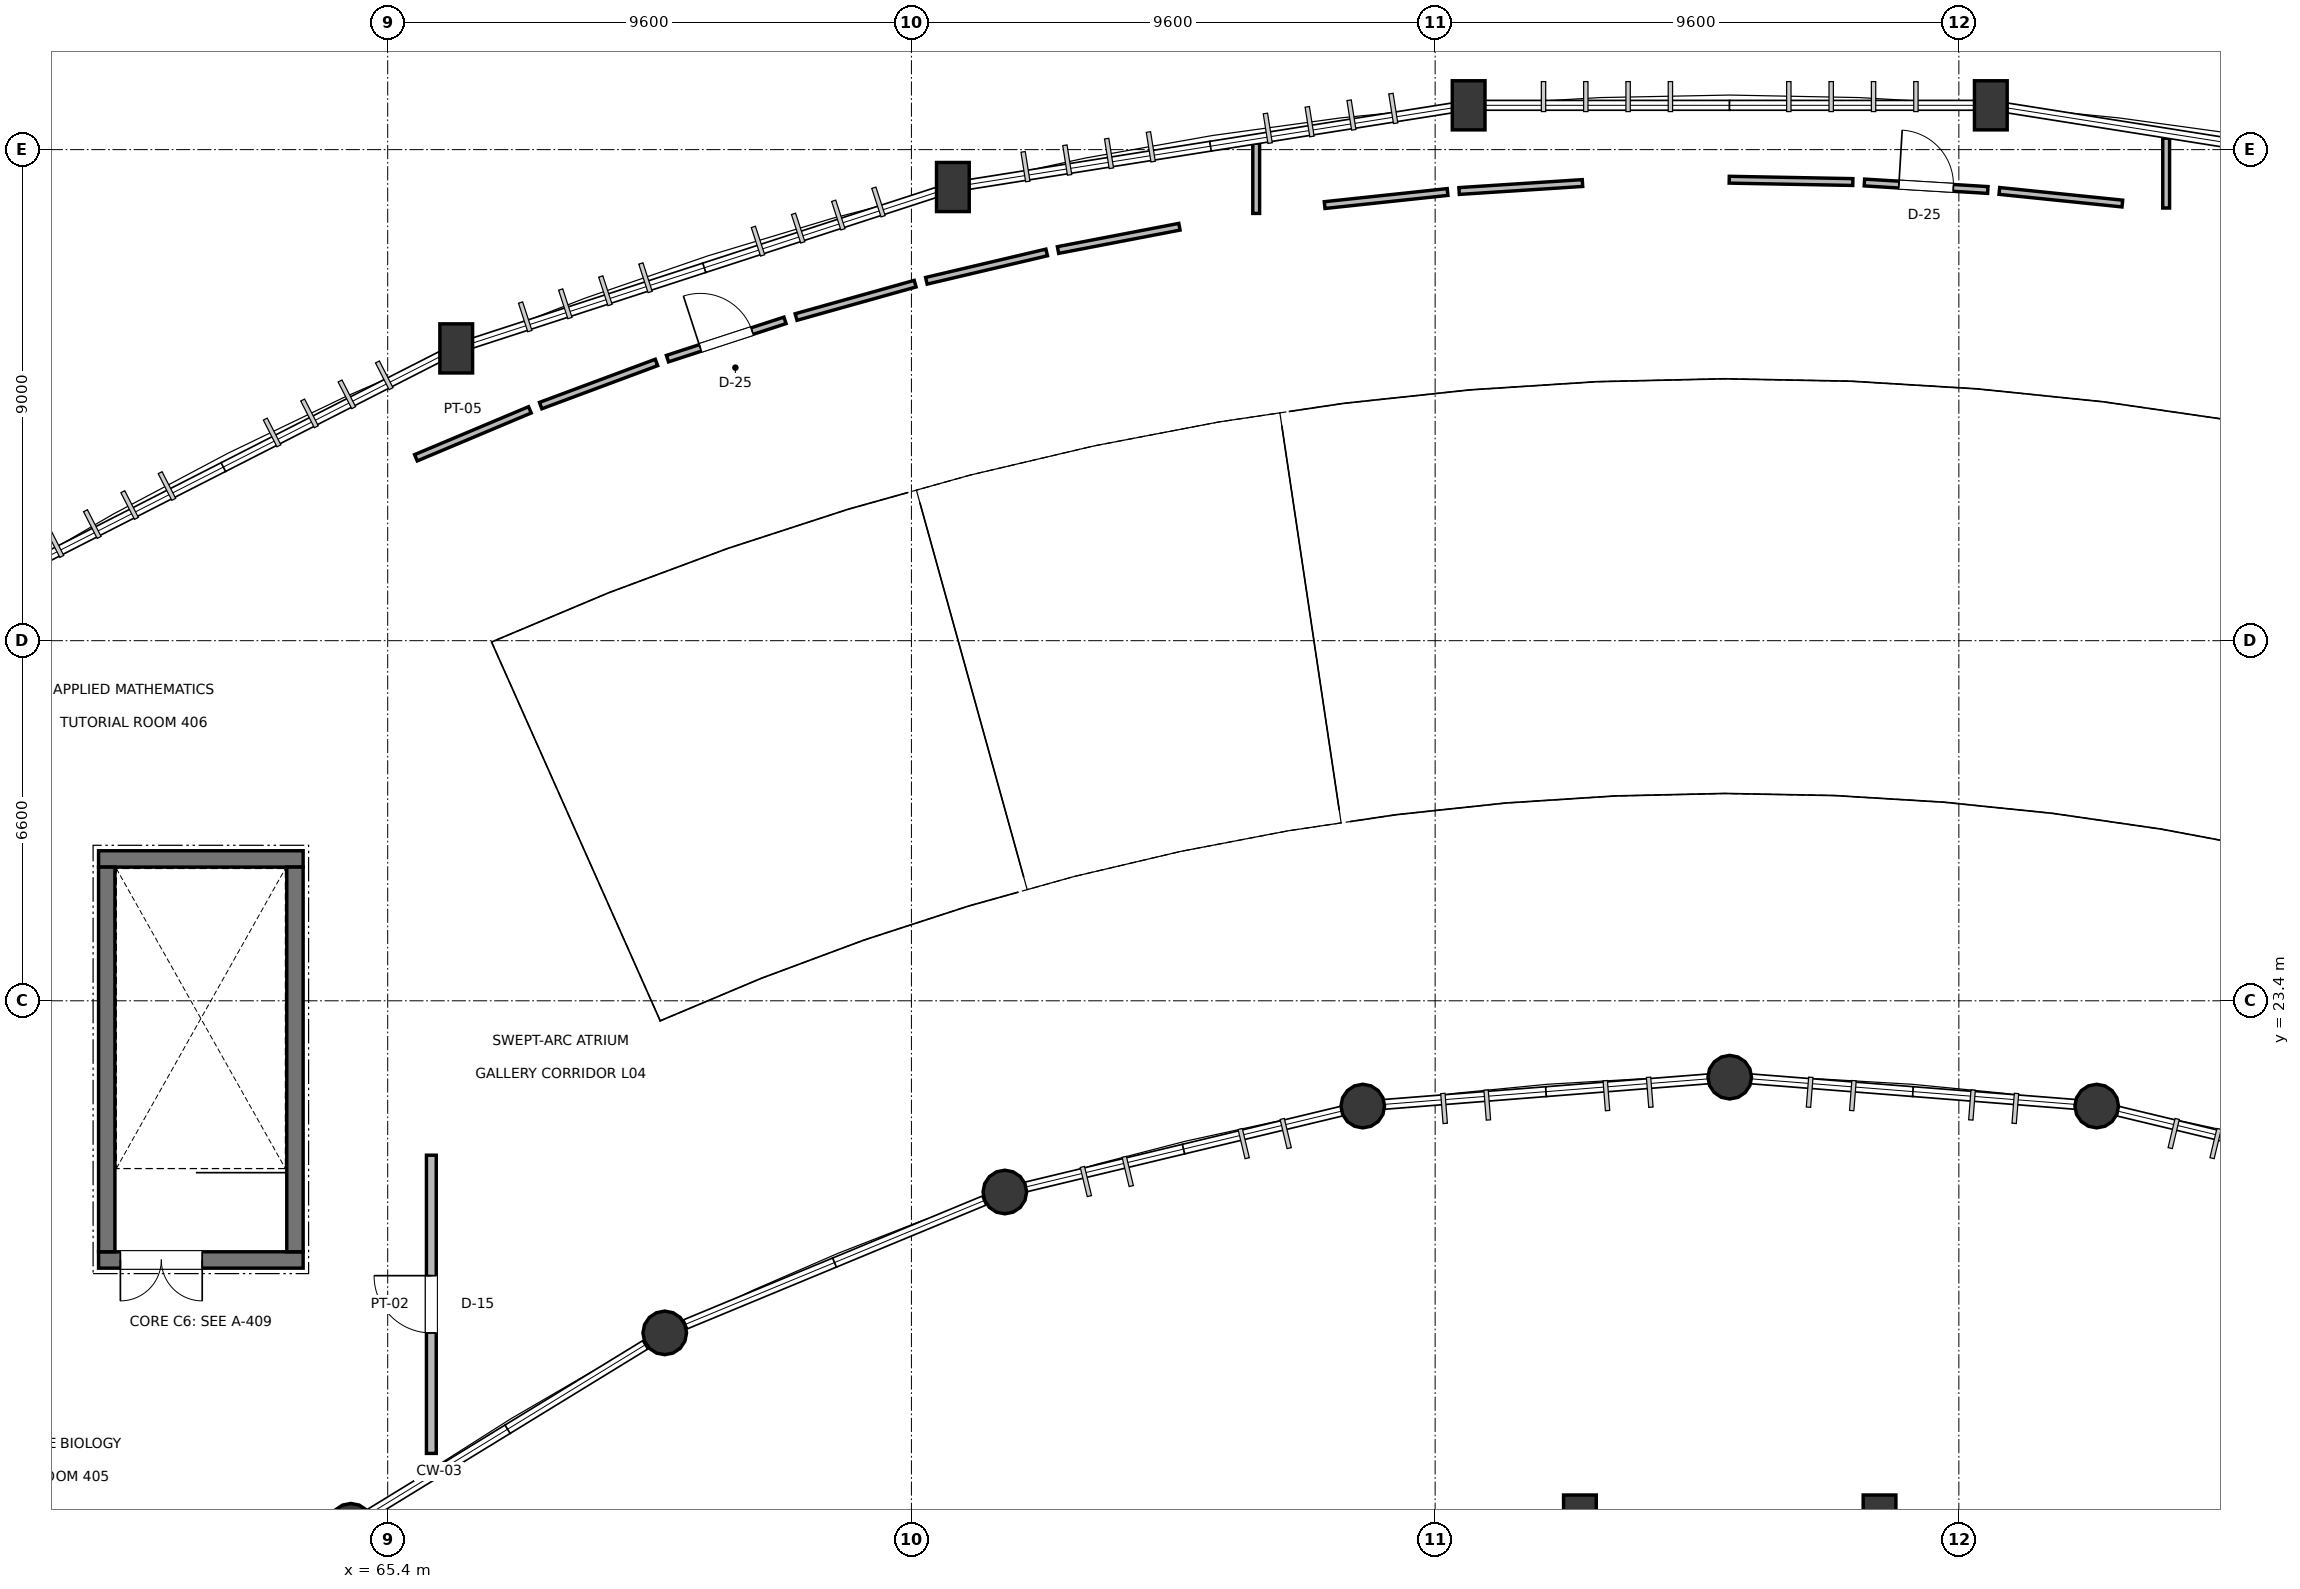
"""IFC4 building model, lengths in metres.
Left out: names, types, materials, properties, quantities, classifications, styles, units other than length and angle.
Written with IfcOpenShell. Run it as: python <this file> out.ifc"""

import sys

from ifc_helpers import new_model, si_unit, direction, frame, frame_2d, origin, origin_2d, place, context, subcontext, project, spatial, rectangle, circle, extrude, element, fill, save


model = new_model("IFC4")
c1 = context("Model", 3, precision=1e-05, world=origin(), true_north=direction((0.0, 1.0)))
c2 = subcontext(c1, "Body", "Model", "MODEL_VIEW")
j1 = project(units=[si_unit("LENGTHUNIT", "METRE"), si_unit("PLANEANGLEUNIT", "RADIAN")], contexts=[c1])
p1 = place(None, origin())
s1 = spatial("IfcSite", under=j1, at=p1, CompositionType="ELEMENT")
p2 = place(p1, origin())
s2 = spatial("IfcBuilding", under=s1, at=p2, CompositionType="ELEMENT")
p3 = place(p2, frame((0.0, 0.0, 19.5)))
s3 = spatial("IfcBuildingStorey", under=s2, at=p3, CompositionType="ELEMENT", Elevation=19.5)
for number, where, z_axis, x_axis in (
    (1, (66.656, 35.357, 0.0), (0.0, 0.0, 1.0), (1.0, 0.0, 0.0)),
    (2, (75.76, 38.315, 0.0), (0.0, 0.0, 1.0), (1.0, 0.0, 0.0)),
    (3, (87.254, 13.892, 0.0), (0.0, 0.0, 1.0), (1.0, 0.0, 0.0)),
    (4, (85.214, 39.812, 0.0), (0.0, 0.0, 1.0), (1.0, 0.0, 0.0)),
    (5, (92.746, 13.892, 0.0), (0.0, 0.0, 1.0), (1.0, 0.0, 0.0)),
    (6, (94.786, 39.812, 0.0), (0.0, 0.0, 1.0), (1.0, 0.0, 0.0)),
):
    element("IfcColumn", number, at=place(p3, frame(where, z_axis=z_axis, x_axis=x_axis)), inside=s3, PredefinedType="COLUMN", context=c2, shape_type="SweptSolid", body=[
        extrude(rectangle(XDim=0.6, YDim=0.9, at=origin_2d()), origin(), (0.0, 0.0, 1.0), 4.5),
    ])
for number, where, z_axis, x_axis in (
    (7, (64.725, 13.788, 0.0), (0.0, 0.0, 1.0), (1.0, 0.0, 0.0)),
    (8, (70.479, 17.313, 0.0), (0.0, 0.0, 1.0), (1.0, 0.0, 0.0)),
    (9, (76.712, 19.896, 0.0), (0.0, 0.0, 1.0), (1.0, 0.0, 0.0)),
    (10, (83.273, 21.471, 0.0), (0.0, 0.0, 1.0), (1.0, 0.0, 0.0)),
    (11, (90.0, 22.0, 0.0), (0.0, 0.0, 1.0), (1.0, 0.0, 0.0)),
    (12, (96.727, 21.471, 0.0), (0.0, 0.0, 1.0), (1.0, 0.0, 0.0)),
):
    element("IfcColumn", number, at=place(p3, frame(where, z_axis=z_axis, x_axis=x_axis)), inside=s3, PredefinedType="COLUMN", context=c2, shape_type="SweptSolid", body=[
        extrude(circle(Radius=0.4, at=origin_2d()), origin(), (0.0, 0.0, 1.0), 4.5),
    ])
p4 = place(p3, frame((60.1, 18.65, 0.0), z_axis=(0.0, 0.0, 1.0), x_axis=(1.0, 0.0, 0.0)))
e13 = element("IfcWall", 13, at=p4, inside=s3, PredefinedType="SHEAR", context=c2, shape_type="SweptSolid", body=[
    extrude(rectangle(XDim=3.75, YDim=0.3, at=frame_2d((1.875, 0.0))), origin(), (0.0, 0.0, 1.0), 4.28),
])
p5 = place(p4, frame((0.4, 0.0, 0.0)))
e14 = element("IfcOpeningElement", 14, at=p5, cuts=e13, PredefinedType="OPENING", context=c2, shape_type="SweptSolid", body=[
    extrude(rectangle(XDim=1.5, YDim=2.2, at=frame_2d((0.75, 1.1))), frame((0.0, 0.16, 0.0), z_axis=(0.0, -1.0, 0.0), x_axis=(1.0, 0.0, 0.0)), (0.0, 0.0, 1.0), 0.32),
])
p6 = place(p3, frame((60.1, 26.0, 0.0), z_axis=(0.0, 0.0, 1.0), x_axis=(1.0, 0.0, 0.0)))
e15 = element("IfcWall", 15, at=p6, inside=s3, PredefinedType="SHEAR", context=c2, shape_type="SweptSolid", body=[
    extrude(rectangle(XDim=3.75, YDim=0.3, at=frame_2d((1.875, 0.0))), origin(), (0.0, 0.0, 1.0), 4.28),
])
for number, where, z_axis, x_axis in (
    (16, (60.25, 18.8, 0.0), (0.0, 0.0, 1.0), (0.0, 1.0, 0.0)),
    (17, (63.7, 18.8, 0.0), (0.0, 0.0, 1.0), (0.0, 1.0, 0.0)),
):
    element("IfcWall", number, at=place(p3, frame(where, z_axis=z_axis, x_axis=x_axis)), inside=s3, PredefinedType="SHEAR", context=c2, shape_type="SweptSolid", body=[
        extrude(rectangle(XDim=7.05, YDim=0.3, at=frame_2d((3.525, 0.0))), origin(), (0.0, 0.0, 1.0), 4.28),
    ])
for number, where, z_axis, x_axis in (
    (18, (65.917, 33.352, 0.0), (0.0, 0.0, 1.0), (0.922, 0.388, 0.0)),
    (19, (68.203, 34.309, 0.0), (0.0, 0.0, 1.0), (0.937, 0.349, 0.0)),
):
    element("IfcWall", number, at=place(p3, frame(where, z_axis=z_axis, x_axis=x_axis)), inside=s3, PredefinedType="PARTITIONING", context=c2, shape_type="SweptSolid", body=[
        extrude(rectangle(XDim=2.266, YDim=0.125, at=frame_2d((1.133, 0.0))), origin(), (0.0, 0.0, 1.0), 3.405),
    ])
p7 = place(p3, frame((70.528, 35.169, 0.0), z_axis=(0.0, 0.0, 1.0), x_axis=(0.950910506912, 0.309466004345, 0.0)))
e20 = element("IfcWall", 20, at=p7, inside=s3, PredefinedType="PARTITIONING", context=c2, shape_type="SweptSolid", body=[
    extrude(rectangle(XDim=2.267, YDim=0.125, at=frame_2d((1.133, 0.0))), origin(), (0.0, 0.0, 1.0), 3.405),
])
p8 = place(p7, frame((0.633, 0.0, 0.0)))
e21 = element("IfcOpeningElement", 21, at=p8, cuts=e20, PredefinedType="OPENING", context=c2, shape_type="SweptSolid", body=[
    extrude(rectangle(XDim=1.0, YDim=2.15, at=frame_2d((0.5, 1.075))), frame((0.0, 0.073, 0.0), z_axis=(0.0, -1.0, 0.0), x_axis=(1.0, 0.0, 0.0)), (0.0, 0.0, 1.0), 0.145),
])
for number, where, z_axis, x_axis in (
    (22, (72.886, 35.932, 0.0), (0.0, 0.0, 1.0), (0.963, 0.27, 0.0)),
    (23, (75.274, 36.596, 0.0), (0.0, 0.0, 1.0), (0.973, 0.229, 0.0)),
):
    element("IfcWall", number, at=place(p3, frame(where, z_axis=z_axis, x_axis=x_axis)), inside=s3, PredefinedType="PARTITIONING", context=c2, shape_type="SweptSolid", body=[
        extrude(rectangle(XDim=2.266, YDim=0.125, at=frame_2d((1.133, 0.0))), origin(), (0.0, 0.0, 1.0), 3.405),
    ])
p9 = place(p3, frame((77.688, 37.16, 0.0), z_axis=(0.0, 0.0, 1.0), x_axis=(0.982087808033, 0.188423823634, 0.0)))
e24 = element("IfcWall", 24, at=p9, inside=s3, PredefinedType="PARTITIONING", context=c2, shape_type="SweptSolid", body=[
    extrude(rectangle(XDim=2.266, YDim=0.125, at=frame_2d((1.133, 0.0))), origin(), (0.0, 0.0, 1.0), 4.18),
])
p10 = place(p3, frame((82.574, 37.983, 0.0), z_axis=(0.0, 0.0, 1.0), x_axis=(0.994366469197, 0.105996815696, 0.0)))
e25 = element("IfcWall", 25, at=p10, inside=s3, PredefinedType="PARTITIONING", context=c2, shape_type="SweptSolid", body=[
    extrude(rectangle(XDim=2.266, YDim=0.125, at=frame_2d((1.133, 0.0))), origin(), (0.0, 0.0, 1.0), 3.405),
])
p11 = place(p3, frame((85.039, 38.241, 0.0), z_axis=(0.0, 0.0, 1.0), x_axis=(0.997915696942, 0.064531091706, 0.0)))
e26 = element("IfcWall", 26, at=p11, inside=s3, PredefinedType="PARTITIONING", context=c2, shape_type="SweptSolid", body=[
    extrude(rectangle(XDim=2.266, YDim=0.125, at=frame_2d((1.133, 0.0))), origin(), (0.0, 0.0, 1.0), 3.405),
])
p12 = place(p3, frame((89.991, 38.448, 0.0), z_axis=(0.0, 0.0, 1.0), x_axis=(0.999822278173, -0.018852375679, 0.0)))
e27 = element("IfcWall", 27, at=p12, inside=s3, PredefinedType="PARTITIONING", context=c2, shape_type="SweptSolid", body=[
    extrude(rectangle(XDim=2.266, YDim=0.125, at=frame_2d((1.133, 0.0))), origin(), (0.0, 0.0, 1.0), 4.18),
])
p13 = place(p3, frame((92.469, 38.397, 0.0), z_axis=(0.0, 0.0, 1.0), x_axis=(0.998159220571, -0.060647921561, 0.0)))
e28 = element("IfcWall", 28, at=p13, inside=s3, PredefinedType="PARTITIONING", context=c2, shape_type="SweptSolid", body=[
    extrude(rectangle(XDim=2.266, YDim=0.125, at=frame_2d((1.133, 0.0))), origin(), (0.0, 0.0, 1.0), 3.405),
])
p14 = place(p13, frame((0.633, 0.0, 0.0)))
e29 = element("IfcOpeningElement", 29, at=p14, cuts=e28, PredefinedType="OPENING", context=c2, shape_type="SweptSolid", body=[
    extrude(rectangle(XDim=1.0, YDim=2.15, at=frame_2d((0.5, 1.075))), frame((0.0, 0.073, 0.0), z_axis=(0.0, -1.0, 0.0), x_axis=(1.0, 0.0, 0.0)), (0.0, 0.0, 1.0), 0.145),
])
p15 = place(p3, frame((94.942, 38.243, 0.0), z_axis=(0.0, 0.0, 1.0), x_axis=(0.994772464136, -0.102116328749, 0.0)))
e30 = element("IfcWall", 30, at=p15, inside=s3, PredefinedType="PARTITIONING", context=c2, shape_type="SweptSolid", body=[
    extrude(rectangle(XDim=2.267, YDim=0.125, at=frame_2d((1.133, 0.0))), origin(), (0.0, 0.0, 1.0), 3.405),
])
p16 = place(p3, frame((66.2, 15.105, 0.0), z_axis=(0.0, 0.0, 1.0), x_axis=(0.0, 1.0, 0.0)))
e31 = element("IfcWall", 31, at=p16, inside=s3, PredefinedType="PARTITIONING", context=c2, shape_type="SweptSolid", body=[
    extrude(rectangle(XDim=5.465, YDim=0.18, at=frame_2d((2.733, 0.0))), origin(), (0.0, 0.0, 1.0), 3.405),
])
p17 = place(p16, frame((2.208, 0.0, 0.0)))
e32 = element("IfcOpeningElement", 32, at=p17, cuts=e31, PredefinedType="OPENING", context=c2, shape_type="SweptSolid", body=[
    extrude(rectangle(XDim=1.05, YDim=2.2, at=frame_2d((0.525, 1.1))), frame((0.0, 0.1, 0.0), z_axis=(0.0, -1.0, 0.0), x_axis=(1.0, 0.0, 0.0)), (0.0, 0.0, 1.0), 0.2),
])
p18 = place(p3, frame((81.32, 37.831, 0.0), z_axis=(0.0, 0.0, 1.0), x_axis=(0.0, 1.0, 0.0)))
e33 = element("IfcWall", 33, at=p18, inside=s3, PredefinedType="PARTITIONING", context=c2, shape_type="SweptSolid", body=[
    extrude(rectangle(XDim=1.286, YDim=0.125, at=frame_2d((0.643, 0.0))), origin(), (0.0, 0.0, 1.0), 3.405),
])
p19 = place(p3, frame((98.0, 37.929, 0.0), z_axis=(0.0, 0.0, 1.0), x_axis=(0.0, 1.0, 0.0)))
e34 = element("IfcWall", 34, at=p19, inside=s3, PredefinedType="PARTITIONING", context=c2, shape_type="SweptSolid", body=[
    extrude(rectangle(XDim=1.281, YDim=0.125, at=frame_2d((0.64, 0.0))), origin(), (0.0, 0.0, 1.0), 3.405),
])
p20 = place(p5, frame((1.5, 0.0, 0.0), z_axis=(0.0, 0.0, 1.0), x_axis=(-1.0, 0.0, 0.0)))
e35 = element("IfcDoor", 35, at=p20, inside=s3, OperationType="DOUBLE_DOOR_SINGLE_SWING", PredefinedType="DOOR", context=c2, shape_type="SweptSolid", body=[
    extrude(rectangle(XDim=1.5, YDim=2.2, at=frame_2d((0.75, 1.1))), frame((0.0, 0.025, 0.0), z_axis=(0.0, -1.0, 0.0), x_axis=(1.0, 0.0, 0.0)), (0.0, 0.0, 1.0), 0.05),
])
fill(e14, e35)
p21 = place(p8, origin())
e36 = element("IfcDoor", 36, at=p21, inside=s3, OperationType="SINGLE_SWING_LEFT", PredefinedType="DOOR", context=c2, shape_type="SweptSolid", body=[
    extrude(rectangle(XDim=1.0, YDim=2.15, at=frame_2d((0.5, 1.075))), frame((0.0, 0.025, 0.0), z_axis=(0.0, -1.0, 0.0), x_axis=(1.0, 0.0, 0.0)), (0.0, 0.0, 1.0), 0.05),
])
fill(e21, e36)
p22 = place(p17, origin())
e37 = element("IfcDoor", 37, at=p22, inside=s3, OperationType="SINGLE_SWING_RIGHT", PredefinedType="DOOR", context=c2, shape_type="SweptSolid", body=[
    extrude(rectangle(XDim=1.05, YDim=2.2, at=frame_2d((0.525, 1.1))), frame((0.0, 0.025, 0.0), z_axis=(0.0, -1.0, 0.0), x_axis=(1.0, 0.0, 0.0)), (0.0, 0.0, 1.0), 0.05),
])
fill(e32, e37)
p23 = place(p14, origin())
e38 = element("IfcDoor", 38, at=p23, inside=s3, OperationType="SINGLE_SWING_LEFT", PredefinedType="DOOR", context=c2, shape_type="SweptSolid", body=[
    extrude(rectangle(XDim=1.0, YDim=2.15, at=frame_2d((0.5, 1.075))), frame((0.0, 0.025, 0.0), z_axis=(0.0, -1.0, 0.0), x_axis=(1.0, 0.0, 0.0)), (0.0, 0.0, 1.0), 0.05),
])
fill(e29, e38)
save(model, sys.argv[1])
